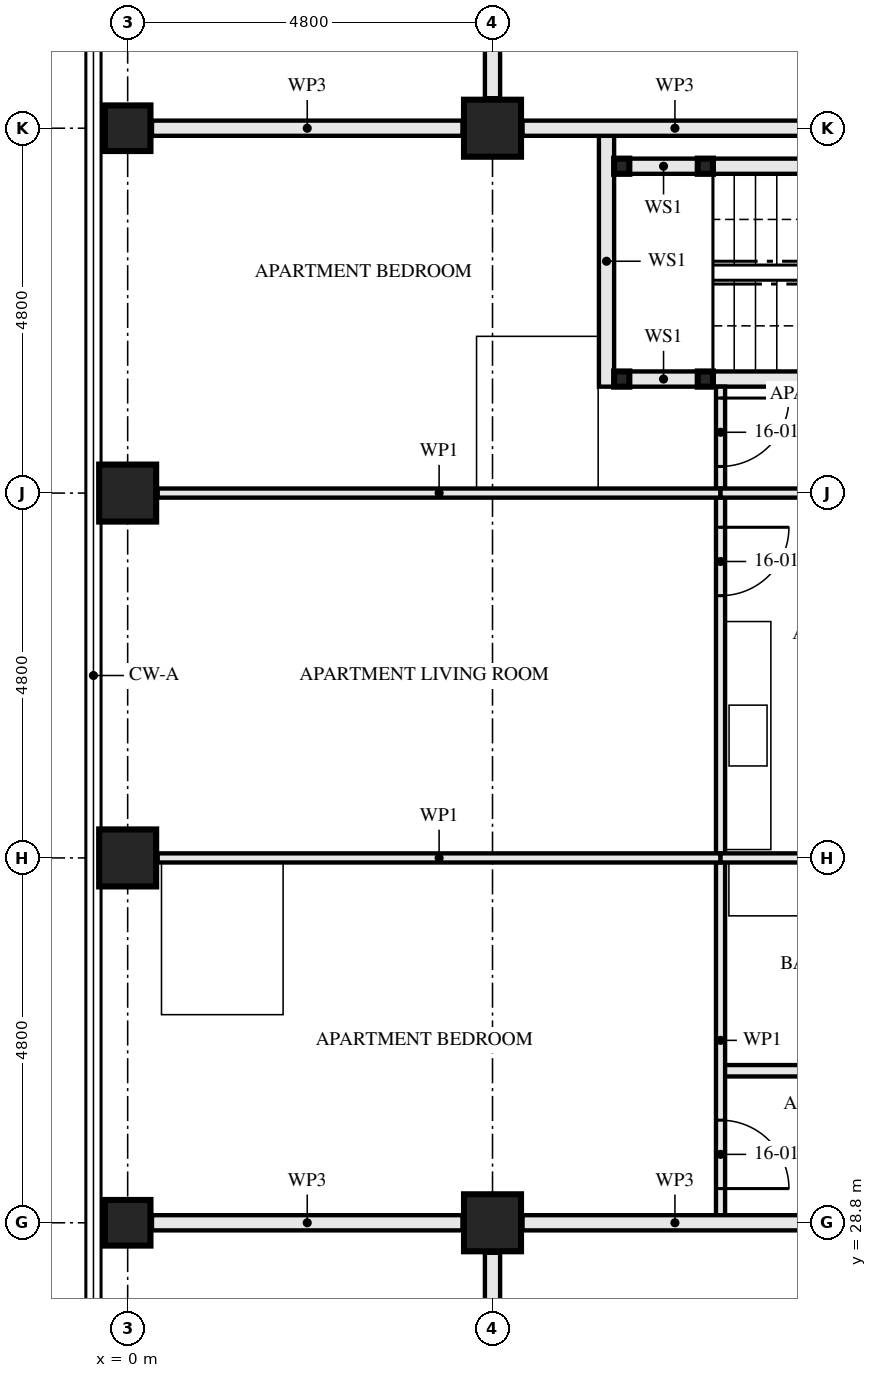
"""IFC4 building model, lengths in metres.
Left out: names, types, materials, properties, quantities, classifications, styles, units other than length and angle.
Written with IfcOpenShell. Run it as: python <this file> out.ifc"""

import sys

from ifc_helpers import new_model, si_unit, direction, frame, frame_2d, origin, origin_2d, place, context, subcontext, project, spatial, rectangle, hollow_rectangle, extrude, element, fill, save


model = new_model("IFC4")
c1 = context("Model", 3, precision=1e-05, world=origin(), true_north=direction((0.0, 1.0)))
c2 = subcontext(c1, "Body", "Model", "MODEL_VIEW")
j1 = project(units=[si_unit("LENGTHUNIT", "METRE"), si_unit("PLANEANGLEUNIT", "RADIAN")], contexts=[c1])
p1 = place(None, origin())
s1 = spatial("IfcSite", under=j1, at=p1, CompositionType="ELEMENT")
p2 = place(p1, origin())
s2 = spatial("IfcBuilding", under=s1, at=p2, CompositionType="ELEMENT")
p3 = place(p2, frame((0.0, 0.0, 62.0)))
s3 = spatial("IfcBuildingStorey", under=s2, at=p3, CompositionType="ELEMENT", Elevation=62.0)
p4 = place(p3, frame((0.0, 28.8, 0.0), z_axis=(0.0, 0.0, 1.0), x_axis=(0.0, 1.0, 0.0)))
e1 = element("IfcColumn", 1, at=p4, inside=s3, PredefinedType="COLUMN", context=c2, shape_type="SweptSolid", body=[
    extrude(hollow_rectangle(XDim=0.6, YDim=0.6, WallThickness=0.08, at=origin_2d()), origin(), (0.0, 0.0, 1.0), 3.5),
])
for number, where, z_axis, x_axis in (
    (2, (0.0, 33.6, 0.0), (0.0, 0.0, 1.0), (1.0, 0.0, 0.0)),
    (3, (0.0, 38.4, 0.0), (0.0, 0.0, 1.0), (1.0, 0.0, 0.0)),
):
    element("IfcColumn", number, at=place(p3, frame(where, z_axis=z_axis, x_axis=x_axis)), inside=s3, PredefinedType="COLUMN", context=c2, shape_type="SweptSolid", body=[
        extrude(hollow_rectangle(XDim=0.75, YDim=0.75, WallThickness=0.08, at=origin_2d()), origin(), (0.0, 0.0, 1.0), 3.5),
    ])
p5 = place(p3, frame((0.0, 43.2, 0.0), z_axis=(0.0, 0.0, 1.0), x_axis=(0.0, 1.0, 0.0)))
e4 = element("IfcColumn", 4, at=p5, inside=s3, PredefinedType="COLUMN", context=c2, shape_type="SweptSolid", body=[
    extrude(hollow_rectangle(XDim=0.6, YDim=0.6, WallThickness=0.08, at=origin_2d()), origin(), (0.0, 0.0, 1.0), 3.5),
])
for number, where, z_axis, x_axis in (
    (5, (4.8, 28.8, 0.0), (0.0, 0.0, 1.0), (0.0, 1.0, 0.0)),
    (6, (4.8, 43.2, 0.0), (0.0, 0.0, 1.0), (0.0, 1.0, 0.0)),
):
    element("IfcColumn", number, at=place(p3, frame(where, z_axis=z_axis, x_axis=x_axis)), inside=s3, PredefinedType="COLUMN", context=c2, shape_type="SweptSolid", body=[
        extrude(hollow_rectangle(XDim=0.75, YDim=0.75, WallThickness=0.08, at=origin_2d()), origin(), (0.0, 0.0, 1.0), 3.5),
    ])
for number, where, z_axis, x_axis in (
    (7, (6.5, 42.7, 0.0), (0.0, 0.0, 1.0), (1.0, 0.0, 0.0)),
    (8, (6.5, 39.9, 0.0), (0.0, 0.0, 1.0), (1.0, 0.0, 0.0)),
    (9, (7.6, 42.7, 0.0), (0.0, 0.0, 1.0), (1.0, 0.0, 0.0)),
    (10, (7.6, 39.9, 0.0), (0.0, 0.0, 1.0), (1.0, 0.0, 0.0)),
):
    element("IfcColumn", number, at=place(p3, frame(where, z_axis=z_axis, x_axis=x_axis)), inside=s3, PredefinedType="COLUMN", context=c2, shape_type="SweptSolid", body=[
        extrude(hollow_rectangle(XDim=0.2, YDim=0.2, WallThickness=0.008, at=origin_2d()), origin(), (0.0, 0.0, 1.0), 3.33),
    ])
p6 = place(p3, frame((4.8, 26.8, 0.0), z_axis=(0.0, 0.0, 1.0), x_axis=(0.0, 1.0, 0.0)))
e11 = element("IfcWall", 11, at=p6, inside=s3, PredefinedType="PARTITIONING", context=c2, shape_type="SweptSolid", body=[
    extrude(rectangle(XDim=1.605, YDim=0.2, at=frame_2d((0.802, 0.0))), origin(), (0.0, 0.0, 1.0), 3.33),
])
p7 = place(p3, frame((6.6, 42.7, 0.0), z_axis=(0.0, 0.0, 1.0), x_axis=(1.0, 0.0, 0.0)))
e12 = element("IfcWall", 12, at=p7, inside=s3, PredefinedType="SOLIDWALL", context=c2, shape_type="SweptSolid", body=[
    extrude(rectangle(XDim=0.9, YDim=0.2, at=frame_2d((0.45, 0.0))), origin(), (0.0, 0.0, 1.0), 2.99),
])
p8 = place(p3, frame((7.7, 42.7, 0.0), z_axis=(0.0, 0.0, 1.0), x_axis=(1.0, 0.0, 0.0)))
e13 = element("IfcWall", 13, at=p8, inside=s3, PredefinedType="SOLIDWALL", context=c2, shape_type="SweptSolid", body=[
    extrude(rectangle(XDim=4.7, YDim=0.2, at=frame_2d((2.35, 0.0))), origin(), (0.0, 0.0, 1.0), 2.99),
])
p9 = place(p3, frame((6.6, 39.9, 0.0), z_axis=(0.0, 0.0, 1.0), x_axis=(1.0, 0.0, 0.0)))
e14 = element("IfcWall", 14, at=p9, inside=s3, PredefinedType="SOLIDWALL", context=c2, shape_type="SweptSolid", body=[
    extrude(rectangle(XDim=0.9, YDim=0.2, at=frame_2d((0.45, 0.0))), origin(), (0.0, 0.0, 1.0), 2.99),
])
p10 = place(p3, frame((7.7, 39.9, 0.0), z_axis=(0.0, 0.0, 1.0), x_axis=(1.0, 0.0, 0.0)))
e15 = element("IfcWall", 15, at=p10, inside=s3, PredefinedType="SOLIDWALL", context=c2, shape_type="SweptSolid", body=[
    extrude(rectangle(XDim=4.7, YDim=0.2, at=frame_2d((2.35, 0.0))), origin(), (0.0, 0.0, 1.0), 2.99),
])
p11 = place(p3, frame((6.3, 43.1, 0.0), z_axis=(0.0, 0.0, 1.0), x_axis=(0.0, -1.0, 0.0)))
e16 = element("IfcWall", 16, at=p11, inside=s3, PredefinedType="SOLIDWALL", context=c2, shape_type="SweptSolid", body=[
    extrude(rectangle(XDim=3.3, YDim=0.2, at=frame_2d((1.65, 0.0))), origin(), (0.0, 0.0, 1.0), 3.33),
])
p12 = place(p3, frame((7.8, 30.8, 0.0), z_axis=(0.0, 0.0, 1.0), x_axis=(1.0, 0.0, 0.0)))
e17 = element("IfcWall", 17, at=p12, inside=s3, PredefinedType="PARTITIONING", context=c2, shape_type="SweptSolid", body=[
    extrude(rectangle(XDim=3.0, YDim=0.15, at=frame_2d((1.5, 0.0))), origin(), (0.0, 0.0, 1.0), 3.33),
])
p13 = place(p12, frame((1.05, 0.0, 0.0)))
e18 = element("IfcOpeningElement", 18, at=p13, cuts=e17, PredefinedType="OPENING", context=c2, shape_type="SweptSolid", body=[
    extrude(rectangle(XDim=0.9, YDim=2.1, at=frame_2d((0.45, 1.05))), frame((0.0, 0.085, 0.0), z_axis=(0.0, -1.0, 0.0), x_axis=(1.0, 0.0, 0.0)), (0.0, 0.0, 1.0), 0.171),
])
p14 = place(p3, frame((7.8, 38.4, 0.0), z_axis=(0.0, 0.0, 1.0), x_axis=(1.0, 0.0, 0.0)))
e19 = element("IfcWall", 19, at=p14, inside=s3, PredefinedType="PARTITIONING", context=c2, shape_type="SweptSolid", body=[
    extrude(rectangle(XDim=4.65, YDim=0.12, at=frame_2d((2.325, 0.0))), origin(), (0.0, 0.0, 1.0), 2.55),
])
p15 = place(p14, frame((1.875, 0.0, 0.0)))
e20 = element("IfcOpeningElement", 20, at=p15, cuts=e19, PredefinedType="OPENING", context=c2, shape_type="SweptSolid", body=[
    extrude(rectangle(XDim=0.9, YDim=2.1, at=frame_2d((0.45, 1.05))), frame((0.0, 0.071, 0.0), z_axis=(0.0, -1.0, 0.0), x_axis=(1.0, 0.0, 0.0)), (0.0, 0.0, 1.0), 0.141),
])
p16 = place(p3, frame((7.8, 33.6, 0.0), z_axis=(0.0, 0.0, 1.0), x_axis=(1.0, 0.0, 0.0)))
e21 = element("IfcWall", 21, at=p16, inside=s3, PredefinedType="PARTITIONING", context=c2, shape_type="SweptSolid", body=[
    extrude(rectangle(XDim=4.65, YDim=0.12, at=frame_2d((2.325, 0.0))), origin(), (0.0, 0.0, 1.0), 2.55),
])
p17 = place(p16, frame((3.35, 0.0, 0.0)))
e22 = element("IfcOpeningElement", 22, at=p17, cuts=e21, PredefinedType="OPENING", context=c2, shape_type="SweptSolid", body=[
    extrude(rectangle(XDim=0.9, YDim=2.1, at=frame_2d((0.45, 1.05))), frame((0.0, 0.071, 0.0), z_axis=(0.0, -1.0, 0.0), x_axis=(1.0, 0.0, 0.0)), (0.0, 0.0, 1.0), 0.141),
])
p18 = place(p3, frame((7.8, 39.8, 0.0), z_axis=(0.0, 0.0, 1.0), x_axis=(0.0, -1.0, 0.0)))
e23 = element("IfcWall", 23, at=p18, inside=s3, PredefinedType="PARTITIONING", context=c2, shape_type="SweptSolid", body=[
    extrude(rectangle(XDim=1.4, YDim=0.12, at=frame_2d((0.7, 0.0))), origin(), (0.0, 0.0, 1.0), 3.33),
])
p19 = place(p18, frame((0.15, 0.0, 0.0)))
e24 = element("IfcOpeningElement", 24, at=p19, cuts=e23, PredefinedType="OPENING", context=c2, shape_type="SweptSolid", body=[
    extrude(rectangle(XDim=0.9, YDim=2.1, at=frame_2d((0.45, 1.05))), frame((0.0, 0.071, 0.0), z_axis=(0.0, -1.0, 0.0), x_axis=(1.0, 0.0, 0.0)), (0.0, 0.0, 1.0), 0.141),
])
p20 = place(p3, frame((7.8, 38.4, 0.0), z_axis=(0.0, 0.0, 1.0), x_axis=(0.0, -1.0, 0.0)))
e25 = element("IfcWall", 25, at=p20, inside=s3, PredefinedType="PARTITIONING", context=c2, shape_type="SweptSolid", body=[
    extrude(rectangle(XDim=4.8, YDim=0.12, at=frame_2d((2.4, 0.0))), origin(), (0.0, 0.0, 1.0), 3.33),
])
p21 = place(p20, frame((0.45, 0.0, 0.0)))
e26 = element("IfcOpeningElement", 26, at=p21, cuts=e25, PredefinedType="OPENING", context=c2, shape_type="SweptSolid", body=[
    extrude(rectangle(XDim=0.9, YDim=2.1, at=frame_2d((0.45, 1.05))), frame((0.0, 0.071, 0.0), z_axis=(0.0, -1.0, 0.0), x_axis=(1.0, 0.0, 0.0)), (0.0, 0.0, 1.0), 0.141),
])
p22 = place(p3, frame((7.8, 33.6, 0.0), z_axis=(0.0, 0.0, 1.0), x_axis=(0.0, -1.0, 0.0)))
e27 = element("IfcWall", 27, at=p22, inside=s3, PredefinedType="PARTITIONING", context=c2, shape_type="SweptSolid", body=[
    extrude(rectangle(XDim=4.8, YDim=0.12, at=frame_2d((2.4, 0.0))), origin(), (0.0, 0.0, 1.0), 3.33),
])
p23 = place(p22, frame((3.45, 0.0, 0.0)))
e28 = element("IfcOpeningElement", 28, at=p23, cuts=e27, PredefinedType="OPENING", context=c2, shape_type="SweptSolid", body=[
    extrude(rectangle(XDim=0.9, YDim=2.1, at=frame_2d((0.45, 1.05))), frame((0.0, 0.071, 0.0), z_axis=(0.0, -1.0, 0.0), x_axis=(1.0, 0.0, 0.0)), (0.0, 0.0, 1.0), 0.141),
])
for number, where, z_axis, x_axis in (
    (29, (0.395, 38.4, 0.0), (0.0, 0.0, 1.0), (1.0, 0.0, 0.0)),
    (30, (0.395, 33.6, 0.0), (0.0, 0.0, 1.0), (1.0, 0.0, 0.0)),
):
    element("IfcWall", number, at=place(p3, frame(where, z_axis=z_axis, x_axis=x_axis)), inside=s3, PredefinedType="PARTITIONING", context=c2, shape_type="SweptSolid", body=[
        extrude(rectangle(XDim=7.405, YDim=0.12, at=frame_2d((3.703, 0.0))), origin(), (0.0, 0.0, 1.0), 2.55),
    ])
p24 = place(p3, frame((4.8, 45.2, 0.0), z_axis=(0.0, 0.0, 1.0), x_axis=(0.0, -1.0, 0.0)))
e31 = element("IfcWall", 31, at=p24, inside=s3, PredefinedType="PARTITIONING", context=c2, shape_type="SweptSolid", body=[
    extrude(rectangle(XDim=1.605, YDim=0.2, at=frame_2d((0.802, 0.0))), origin(), (0.0, 0.0, 1.0), 3.33),
])
p25 = place(p3, frame((9.205, 28.8, 0.0), z_axis=(0.0, 0.0, 1.0), x_axis=(-1.0, 0.0, 0.0)))
e32 = element("IfcWall", 32, at=p25, inside=s3, PredefinedType="PARTITIONING", context=c2, shape_type="SweptSolid", body=[
    extrude(rectangle(XDim=4.01, YDim=0.2, at=frame_2d((2.005, 0.0))), origin(), (0.0, 0.0, 1.0), 2.32),
])
p26 = place(p3, frame((4.405, 28.8, 0.0), z_axis=(0.0, 0.0, 1.0), x_axis=(-1.0, 0.0, 0.0)))
e33 = element("IfcWall", 33, at=p26, inside=s3, PredefinedType="PARTITIONING", context=c2, shape_type="SweptSolid", body=[
    extrude(rectangle(XDim=4.085, YDim=0.2, at=frame_2d((2.042, 0.0))), origin(), (0.0, 0.0, 1.0), 2.32),
])
p27 = place(p3, frame((9.205, 43.2, 0.0), z_axis=(0.0, 0.0, 1.0), x_axis=(-1.0, 0.0, 0.0)))
e34 = element("IfcWall", 34, at=p27, inside=s3, PredefinedType="PARTITIONING", context=c2, shape_type="SweptSolid", body=[
    extrude(rectangle(XDim=4.01, YDim=0.2, at=frame_2d((2.005, 0.0))), origin(), (0.0, 0.0, 1.0), 2.32),
])
p28 = place(p3, frame((4.405, 43.2, 0.0), z_axis=(0.0, 0.0, 1.0), x_axis=(-1.0, 0.0, 0.0)))
e35 = element("IfcWall", 35, at=p28, inside=s3, PredefinedType="PARTITIONING", context=c2, shape_type="SweptSolid", body=[
    extrude(rectangle(XDim=4.085, YDim=0.2, at=frame_2d((2.042, 0.0))), origin(), (0.0, 0.0, 1.0), 2.32),
])
p29 = place(p19, origin())
e36 = element("IfcDoor", 36, at=p29, inside=s3, OperationType="SINGLE_SWING_RIGHT", PredefinedType="DOOR", context=c2, shape_type="SweptSolid", body=[
    extrude(rectangle(XDim=0.9, YDim=2.1, at=frame_2d((0.45, 1.05))), frame((0.0, 0.022, 0.0), z_axis=(0.0, -1.0, 0.0), x_axis=(1.0, 0.0, 0.0)), (0.0, 0.0, 1.0), 0.044),
])
fill(e24, e36)
p30 = place(p21, origin())
e37 = element("IfcDoor", 37, at=p30, inside=s3, OperationType="SINGLE_SWING_RIGHT", PredefinedType="DOOR", context=c2, shape_type="SweptSolid", body=[
    extrude(rectangle(XDim=0.9, YDim=2.1, at=frame_2d((0.45, 1.05))), frame((0.0, 0.022, 0.0), z_axis=(0.0, -1.0, 0.0), x_axis=(1.0, 0.0, 0.0)), (0.0, 0.0, 1.0), 0.044),
])
fill(e26, e37)
p31 = place(p23, origin())
e38 = element("IfcDoor", 38, at=p31, inside=s3, OperationType="SINGLE_SWING_LEFT", PredefinedType="DOOR", context=c2, shape_type="SweptSolid", body=[
    extrude(rectangle(XDim=0.9, YDim=2.1, at=frame_2d((0.45, 1.05))), frame((0.0, 0.022, 0.0), z_axis=(0.0, -1.0, 0.0), x_axis=(1.0, 0.0, 0.0)), (0.0, 0.0, 1.0), 0.044),
])
fill(e28, e38)
save(model, sys.argv[1])
